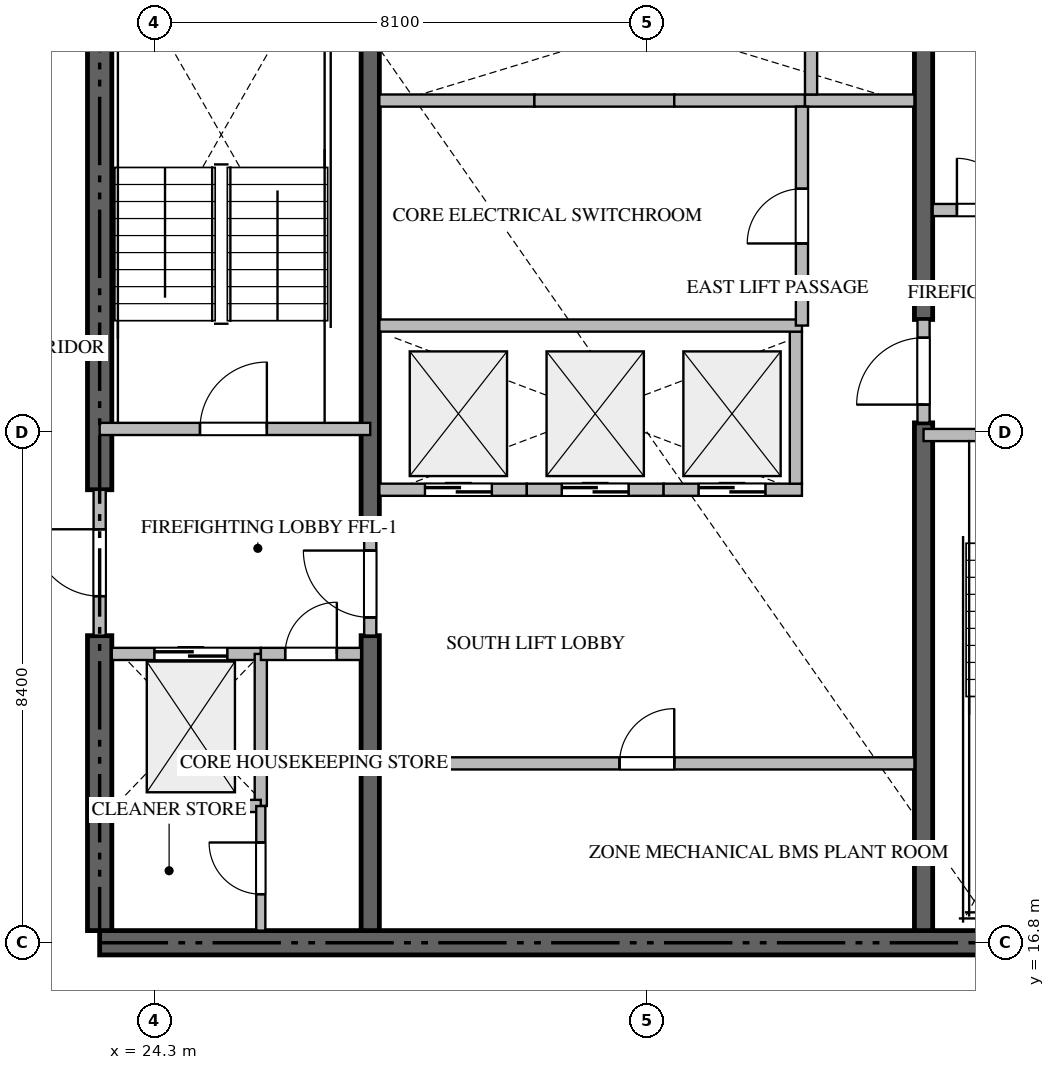
"""IFC4 building model, lengths in metres.
Left out: names, types, materials, properties, quantities, classifications, styles, units other than length and angle.
Written with IfcOpenShell. Run it as: python <this file> out.ifc"""

import sys

from ifc_helpers import new_model, si_unit, direction, frame, frame_2d, origin, place, context, subcontext, project, spatial, rectangle, extrude, source, transform, mapped, element, fill, save


model = new_model("IFC4")
c1 = context("Model", 3, precision=1e-05, world=origin(), true_north=direction((0.0, 1.0)))
c2 = subcontext(c1, "Body", "Model", "MODEL_VIEW")
j1 = project(units=[si_unit("LENGTHUNIT", "METRE"), si_unit("PLANEANGLEUNIT", "RADIAN")], contexts=[c1])
p1 = place(None, origin())
s1 = spatial("IfcSite", under=j1, at=p1, CompositionType="ELEMENT")
p2 = place(p1, origin())
s2 = spatial("IfcBuilding", under=s1, at=p2, CompositionType="ELEMENT")
p3 = place(p2, frame((0.0, 0.0, 146.4)))
s3 = spatial("IfcBuildingStorey", under=s2, at=p3, CompositionType="ELEMENT", Elevation=146.4)
p4 = place(p3, frame((23.4, 16.8, -0.26), z_axis=(0.0, 0.0, 1.0), x_axis=(1.0, 0.0, 0.0)))
e1 = element("IfcWall", 1, at=p4, inside=s3, PredefinedType="SHEAR", context=c2, shape_type="SweptSolid", body=[
    extrude(rectangle(XDim=18.0, YDim=0.4, at=frame_2d((9.0, 0.0))), origin(), (0.0, 0.0, 1.0), 3.748),
])
p5 = place(p3, frame((23.4, 17.0, -0.26), z_axis=(0.0, 0.0, 1.0), x_axis=(0.0, 1.0, 0.0)))
e2 = element("IfcWall", 2, at=p5, inside=s3, PredefinedType="SHEAR", context=c2, shape_type="SweptSolid", body=[
    extrude(rectangle(XDim=4.85, YDim=0.4, at=frame_2d((2.425, 0.0))), origin(), (0.0, 0.0, 1.0), 3.748),
])
p6 = place(p3, frame((23.4, 24.25, -0.26), z_axis=(0.0, 0.0, 1.0), x_axis=(0.0, 1.0, 0.0)))
e3 = element("IfcWall", 3, at=p6, inside=s3, PredefinedType="SHEAR", context=c2, shape_type="SweptSolid", body=[
    extrude(rectangle(XDim=9.15, YDim=0.4, at=frame_2d((4.575, 0.0))), origin(), (0.0, 0.0, 1.0), 3.748),
])
p7 = place(p3, frame((27.85, 17.0, -0.26), z_axis=(0.0, 0.0, 1.0), x_axis=(0.0, 1.0, 0.0)))
e4 = element("IfcWall", 4, at=p7, inside=s3, PredefinedType="SHEAR", context=c2, shape_type="SweptSolid", body=[
    extrude(rectangle(XDim=4.85, YDim=0.3, at=frame_2d((2.425, 0.0))), origin(), (0.0, 0.0, 1.0), 3.748),
])
p8 = place(p3, frame((27.85, 23.55, -0.26), z_axis=(0.0, 0.0, 1.0), x_axis=(0.0, 1.0, 0.0)))
e5 = element("IfcWall", 5, at=p8, inside=s3, PredefinedType="SHEAR", context=c2, shape_type="SweptSolid", body=[
    extrude(rectangle(XDim=9.85, YDim=0.3, at=frame_2d((4.925, 0.0))), origin(), (0.0, 0.0, 1.0), 3.748),
])
p9 = place(p3, frame((36.95, 17.0, -0.26), z_axis=(0.0, 0.0, 1.0), x_axis=(0.0, 1.0, 0.0)))
e6 = element("IfcWall", 6, at=p9, inside=s3, PredefinedType="SHEAR", context=c2, shape_type="SweptSolid", body=[
    extrude(rectangle(XDim=8.35, YDim=0.3, at=frame_2d((4.175, 0.0))), origin(), (0.0, 0.0, 1.0), 3.748),
])
p10 = place(p3, frame((36.95, 27.05, -0.26), z_axis=(0.0, 0.0, 1.0), x_axis=(0.0, 1.0, 0.0)))
e7 = element("IfcWall", 7, at=p10, inside=s3, PredefinedType="SHEAR", context=c2, shape_type="SweptSolid", body=[
    extrude(rectangle(XDim=6.35, YDim=0.3, at=frame_2d((3.175, 0.0))), origin(), (0.0, 0.0, 1.0), 3.748),
])
p11 = place(p3, frame((23.4, 25.25, 0.0), z_axis=(0.0, 0.0, 1.0), x_axis=(1.0, 0.0, 0.0)))
e8 = element("IfcWall", 8, at=p11, inside=s3, PredefinedType="STANDARD", context=c2, shape_type="SweptSolid", body=[
    extrude(rectangle(XDim=4.45, YDim=0.2, at=frame_2d((2.225, 0.0))), origin(), (0.0, 0.0, 1.0), 3.49),
])
p12 = place(p11, frame((1.65, 0.0, 0.0)))
e9 = element("IfcOpeningElement", 9, at=p12, cuts=e8, PredefinedType="OPENING", context=c2, shape_type="SweptSolid", body=[
    extrude(rectangle(XDim=1.1, YDim=2.15, at=frame_2d((0.55, 1.075))), frame((0.0, 0.11, 0.0), z_axis=(0.0, -1.0, 0.0), x_axis=(1.0, 0.0, 0.0)), (0.0, 0.0, 1.0), 0.22),
])
p13 = place(p3, frame((36.95, 25.15, 0.0), z_axis=(0.0, 0.0, 1.0), x_axis=(1.0, 0.0, 0.0)))
e10 = element("IfcWall", 10, at=p13, inside=s3, PredefinedType="STANDARD", context=c2, shape_type="SweptSolid", body=[
    extrude(rectangle(XDim=4.45, YDim=0.2, at=frame_2d((2.225, 0.0))), origin(), (0.0, 0.0, 1.0), 3.49),
])
p14 = place(p13, frame((1.65, 0.0, 0.0)))
e11 = element("IfcOpeningElement", 11, at=p14, cuts=e10, PredefinedType="OPENING", context=c2, shape_type="SweptSolid", body=[
    extrude(rectangle(XDim=1.1, YDim=2.15, at=frame_2d((0.55, 1.075))), frame((0.0, 0.11, 0.0), z_axis=(0.0, -1.0, 0.0), x_axis=(1.0, 0.0, 0.0)), (0.0, 0.0, 1.0), 0.22),
])
p15 = place(p3, frame((23.6, 21.55, 0.0), z_axis=(0.0, 0.0, 1.0), x_axis=(1.0, 0.0, 0.0)))
e12 = element("IfcWall", 12, at=p15, inside=s3, PredefinedType="STANDARD", context=c2, shape_type="SweptSolid", body=[
    extrude(rectangle(XDim=2.45, YDim=0.2, at=frame_2d((1.225, 0.0))), origin(), (0.0, 0.0, 1.0), 3.49),
])
p16 = place(p15, frame((0.7, 0.0, 0.0)))
e13 = element("IfcOpeningElement", 13, at=p16, cuts=e12, PredefinedType="OPENING", context=c2, shape_type="SweptSolid", body=[
    extrude(rectangle(XDim=1.2, YDim=2.2, at=frame_2d((0.6, 1.1))), frame((0.0, 0.11, 0.0), z_axis=(0.0, -1.0, 0.0), x_axis=(1.0, 0.0, 0.0)), (0.0, 0.0, 1.0), 0.22),
])
p17 = place(p3, frame((28.0, 24.25, 0.0), z_axis=(0.0, 0.0, 1.0), x_axis=(1.0, 0.0, 0.0)))
e14 = element("IfcWall", 14, at=p17, inside=s3, PredefinedType="STANDARD", context=c2, shape_type="SweptSolid", body=[
    extrude(rectangle(XDim=2.425, YDim=0.2, at=frame_2d((1.212, 0.0))), origin(), (0.0, 0.0, 1.0), 3.49),
])
p18 = place(p17, frame((0.75, 0.0, 0.0)))
e15 = element("IfcOpeningElement", 15, at=p18, cuts=e14, PredefinedType="OPENING", context=c2, shape_type="SweptSolid", body=[
    extrude(rectangle(XDim=1.1, YDim=2.2, at=frame_2d((0.55, 1.1))), frame((0.0, 0.11, 0.0), z_axis=(0.0, -1.0, 0.0), x_axis=(1.0, 0.0, 0.0)), (0.0, 0.0, 1.0), 0.22),
])
p19 = place(p3, frame((30.425, 24.25, 0.0), z_axis=(0.0, 0.0, 1.0), x_axis=(1.0, 0.0, 0.0)))
e16 = element("IfcWall", 16, at=p19, inside=s3, PredefinedType="STANDARD", context=c2, shape_type="SweptSolid", body=[
    extrude(rectangle(XDim=2.25, YDim=0.2, at=frame_2d((1.125, 0.0))), origin(), (0.0, 0.0, 1.0), 3.49),
])
p20 = place(p19, frame((0.575, 0.0, 0.0)))
e17 = element("IfcOpeningElement", 17, at=p20, cuts=e16, PredefinedType="OPENING", context=c2, shape_type="SweptSolid", body=[
    extrude(rectangle(XDim=1.1, YDim=2.2, at=frame_2d((0.55, 1.1))), frame((0.0, 0.11, 0.0), z_axis=(0.0, -1.0, 0.0), x_axis=(1.0, 0.0, 0.0)), (0.0, 0.0, 1.0), 0.22),
])
p21 = place(p3, frame((32.675, 24.25, 0.0), z_axis=(0.0, 0.0, 1.0), x_axis=(1.0, 0.0, 0.0)))
e18 = element("IfcWall", 18, at=p21, inside=s3, PredefinedType="STANDARD", context=c2, shape_type="SweptSolid", body=[
    extrude(rectangle(XDim=2.275, YDim=0.2, at=frame_2d((1.137, 0.0))), origin(), (0.0, 0.0, 1.0), 3.49),
])
p22 = place(p21, frame((0.575, 0.0, 0.0)))
e19 = element("IfcOpeningElement", 19, at=p22, cuts=e18, PredefinedType="OPENING", context=c2, shape_type="SweptSolid", body=[
    extrude(rectangle(XDim=1.1, YDim=2.2, at=frame_2d((0.55, 1.1))), frame((0.0, 0.11, 0.0), z_axis=(0.0, -1.0, 0.0), x_axis=(1.0, 0.0, 0.0)), (0.0, 0.0, 1.0), 0.22),
])
p23 = place(p3, frame((34.85, 24.35, 0.0), z_axis=(0.0, 0.0, 1.0), x_axis=(0.0, 1.0, 0.0)))
e20 = element("IfcWall", 20, at=p23, inside=s3, PredefinedType="STANDARD", context=c2, shape_type="SweptSolid", body=[
    extrude(rectangle(XDim=2.5, YDim=0.2, at=frame_2d((1.25, 0.0))), origin(), (0.0, 0.0, 1.0), 3.49),
])
p24 = place(p3, frame((28.0, 30.65, 0.0), z_axis=(0.0, 0.0, 1.0), x_axis=(1.0, 0.0, 0.0)))
e21 = element("IfcWall", 21, at=p24, inside=s3, PredefinedType="STANDARD", context=c2, shape_type="SweptSolid", body=[
    extrude(rectangle(XDim=2.55, YDim=0.2, at=frame_2d((1.275, 0.0))), origin(), (0.0, 0.0, 1.0), 3.49),
])
p25 = place(p3, frame((30.55, 30.65, 0.0), z_axis=(0.0, 0.0, 1.0), x_axis=(1.0, 0.0, 0.0)))
e22 = element("IfcWall", 22, at=p25, inside=s3, PredefinedType="STANDARD", context=c2, shape_type="SweptSolid", body=[
    extrude(rectangle(XDim=2.3, YDim=0.2, at=frame_2d((1.15, 0.0))), origin(), (0.0, 0.0, 1.0), 3.49),
])
p26 = place(p3, frame((32.85, 30.65, 0.0), z_axis=(0.0, 0.0, 1.0), x_axis=(1.0, 0.0, 0.0)))
e23 = element("IfcWall", 23, at=p26, inside=s3, PredefinedType="STANDARD", context=c2, shape_type="SweptSolid", body=[
    extrude(rectangle(XDim=2.15, YDim=0.2, at=frame_2d((1.075, 0.0))), origin(), (0.0, 0.0, 1.0), 3.49),
])
p27 = place(p3, frame((35.0, 30.65, 0.0), z_axis=(0.0, 0.0, 1.0), x_axis=(1.0, 0.0, 0.0)))
e24 = element("IfcWall", 24, at=p27, inside=s3, PredefinedType="STANDARD", context=c2, shape_type="SweptSolid", body=[
    extrude(rectangle(XDim=1.8, YDim=0.2, at=frame_2d((0.9, 0.0))), origin(), (0.0, 0.0, 1.0), 3.49),
])
p28 = place(p3, frame((35.1, 30.75, 0.0), z_axis=(0.0, 0.0, 1.0), x_axis=(0.0, 1.0, 0.0)))
e25 = element("IfcWall", 25, at=p28, inside=s3, PredefinedType="STANDARD", context=c2, shape_type="SweptSolid", body=[
    extrude(rectangle(XDim=2.65, YDim=0.2, at=frame_2d((1.325, 0.0))), origin(), (0.0, 0.0, 1.0), 3.49),
])
p29 = place(p3, frame((26.05, 19.05, 0.0), z_axis=(0.0, 0.0, 1.0), x_axis=(0.0, 1.0, 0.0)))
e26 = element("IfcWall", 26, at=p29, inside=s3, PredefinedType="STANDARD", context=c2, shape_type="SweptSolid", body=[
    extrude(rectangle(XDim=2.5, YDim=0.2, at=frame_2d((1.25, 0.0))), origin(), (0.0, 0.0, 1.0), 3.49),
])
p30 = place(p3, frame((23.6, 19.05, 0.0), z_axis=(0.0, 0.0, 1.0), x_axis=(1.0, 0.0, 0.0)))
e27 = element("IfcWall", 27, at=p30, inside=s3, PredefinedType="STANDARD", context=c2, shape_type="SweptSolid", body=[
    extrude(rectangle(XDim=2.45, YDim=0.2, at=frame_2d((1.225, 0.0))), origin(), (0.0, 0.0, 1.0), 3.49),
])
p31 = place(p3, frame((26.052, 21.55, 0.0), z_axis=(0.0, 0.0, 1.0), x_axis=(1.0, 0.0, 0.0)))
e28 = element("IfcWall", 28, at=p31, inside=s3, PredefinedType="STANDARD", context=c2, shape_type="SweptSolid", body=[
    extrude(rectangle(XDim=1.648, YDim=0.2, at=frame_2d((0.824, 0.0))), origin(), (0.0, 0.0, 1.0), 3.49),
])
p32 = place(p31, frame((0.399, 0.0, 0.0)))
e29 = element("IfcOpeningElement", 29, at=p32, cuts=e28, PredefinedType="OPENING", context=c2, shape_type="SweptSolid", body=[
    extrude(rectangle(XDim=0.85, YDim=2.1, at=frame_2d((0.425, 1.05))), frame((0.0, 0.11, 0.0), z_axis=(0.0, -1.0, 0.0), x_axis=(1.0, 0.0, 0.0)), (0.0, 0.0, 1.0), 0.22),
])
p33 = place(p3, frame((37.1, 28.85, 0.0), z_axis=(0.0, 0.0, 1.0), x_axis=(1.0, 0.0, 0.0)))
e30 = element("IfcWall", 30, at=p33, inside=s3, PredefinedType="STANDARD", context=c2, shape_type="SweptSolid", body=[
    extrude(rectangle(XDim=1.648, YDim=0.2, at=frame_2d((0.824, 0.0))), origin(), (0.0, 0.0, 1.0), 3.49),
])
p34 = place(p33, frame((0.399, 0.0, 0.0)))
e31 = element("IfcOpeningElement", 31, at=p34, cuts=e30, PredefinedType="OPENING", context=c2, shape_type="SweptSolid", body=[
    extrude(rectangle(XDim=0.85, YDim=2.1, at=frame_2d((0.425, 1.05))), frame((0.0, 0.11, 0.0), z_axis=(0.0, -1.0, 0.0), x_axis=(1.0, 0.0, 0.0)), (0.0, 0.0, 1.0), 0.22),
])
p35 = place(p3, frame((23.4, 21.852, 0.0), z_axis=(0.0, 0.0, 1.0), x_axis=(0.0, 1.0, 0.0)))
e32 = element("IfcWall", 32, at=p35, inside=s3, PredefinedType="STANDARD", context=c2, shape_type="SweptSolid", body=[
    extrude(rectangle(XDim=2.396, YDim=0.2, at=frame_2d((1.198, 0.0))), origin(), (0.0, 0.0, 1.0), 3.49),
])
p36 = place(p35, frame((0.648, 0.0, 0.0)))
e33 = element("IfcOpeningElement", 33, at=p36, cuts=e32, PredefinedType="OPENING", context=c2, shape_type="SweptSolid", body=[
    extrude(rectangle(XDim=1.1, YDim=2.15, at=frame_2d((0.55, 1.075))), frame((0.0, 0.11, 0.0), z_axis=(0.0, -1.0, 0.0), x_axis=(1.0, 0.0, 0.0)), (0.0, 0.0, 1.0), 0.22),
])
p37 = place(p3, frame((27.85, 21.852, 0.0), z_axis=(0.0, 0.0, 1.0), x_axis=(0.0, 1.0, 0.0)))
e34 = element("IfcWall", 34, at=p37, inside=s3, PredefinedType="STANDARD", context=c2, shape_type="SweptSolid", body=[
    extrude(rectangle(XDim=1.696, YDim=0.2, at=frame_2d((0.848, 0.0))), origin(), (0.0, 0.0, 1.0), 3.49),
])
p38 = place(p37, frame((0.298, 0.0, 0.0)))
e35 = element("IfcOpeningElement", 35, at=p38, cuts=e34, PredefinedType="OPENING", context=c2, shape_type="SweptSolid", body=[
    extrude(rectangle(XDim=1.1, YDim=2.15, at=frame_2d((0.55, 1.075))), frame((0.0, 0.11, 0.0), z_axis=(0.0, -1.0, 0.0), x_axis=(1.0, 0.0, 0.0)), (0.0, 0.0, 1.0), 0.22),
])
p39 = place(p3, frame((36.95, 25.352, 0.0), z_axis=(0.0, 0.0, 1.0), x_axis=(0.0, 1.0, 0.0)))
e36 = element("IfcWall", 36, at=p39, inside=s3, PredefinedType="STANDARD", context=c2, shape_type="SweptSolid", body=[
    extrude(rectangle(XDim=1.696, YDim=0.2, at=frame_2d((0.848, 0.0))), origin(), (0.0, 0.0, 1.0), 3.49),
])
p40 = place(p39, frame((0.298, 0.0, 0.0)))
e37 = element("IfcOpeningElement", 37, at=p40, cuts=e36, PredefinedType="OPENING", context=c2, shape_type="SweptSolid", body=[
    extrude(rectangle(XDim=1.1, YDim=2.15, at=frame_2d((0.55, 1.075))), frame((0.0, 0.11, 0.0), z_axis=(0.0, -1.0, 0.0), x_axis=(1.0, 0.0, 0.0)), (0.0, 0.0, 1.0), 0.22),
])
p41 = place(p3, frame((28.0, 26.95, 0.0), z_axis=(0.0, 0.0, 1.0), x_axis=(1.0, 0.0, 0.0)))
e38 = element("IfcWall", 38, at=p41, inside=s3, PredefinedType="STANDARD", context=c2, shape_type="SweptSolid", body=[
    extrude(rectangle(XDim=6.95, YDim=0.2, at=frame_2d((3.475, 0.0))), origin(), (0.0, 0.0, 1.0), 3.49),
])
p42 = place(p3, frame((26.05, 17.0, 0.0), z_axis=(0.0, 0.0, 1.0), x_axis=(0.0, 1.0, 0.0)))
e39 = element("IfcWall", 39, at=p42, inside=s3, PredefinedType="PARTITIONING", context=c2, shape_type="SweptSolid", body=[
    extrude(rectangle(XDim=2.048, YDim=0.15, at=frame_2d((1.024, 0.0))), origin(), (0.0, 0.0, 1.0), 3.49),
])
p43 = place(p42, frame((0.599, 0.0, 0.0)))
e40 = element("IfcOpeningElement", 40, at=p43, cuts=e39, PredefinedType="OPENING", context=c2, shape_type="SweptSolid", body=[
    extrude(rectangle(XDim=0.85, YDim=2.1, at=frame_2d((0.425, 1.05))), frame((0.0, 0.085, 0.0), z_axis=(0.0, -1.0, 0.0), x_axis=(1.0, 0.0, 0.0)), (0.0, 0.0, 1.0), 0.17),
])
p44 = place(p3, frame((34.95, 26.95, 0.0), z_axis=(0.0, 0.0, 1.0), x_axis=(0.0, 1.0, 0.0)))
e41 = element("IfcWall", 41, at=p44, inside=s3, PredefinedType="STANDARD", context=c2, shape_type="SweptSolid", body=[
    extrude(rectangle(XDim=3.6, YDim=0.2, at=frame_2d((1.8, 0.0))), origin(), (0.0, 0.0, 1.0), 3.49),
])
p45 = place(p44, frame((1.35, 0.0, 0.0)))
e42 = element("IfcOpeningElement", 42, at=p45, cuts=e41, PredefinedType="OPENING", context=c2, shape_type="SweptSolid", body=[
    extrude(rectangle(XDim=0.9, YDim=2.1, at=frame_2d((0.45, 1.05))), frame((0.0, 0.11, 0.0), z_axis=(0.0, -1.0, 0.0), x_axis=(1.0, 0.0, 0.0)), (0.0, 0.0, 1.0), 0.22),
])
p46 = place(p3, frame((28.0, 19.75, 0.0), z_axis=(0.0, 0.0, 1.0), x_axis=(1.0, 0.0, 0.0)))
e43 = element("IfcWall", 43, at=p46, inside=s3, PredefinedType="STANDARD", context=c2, shape_type="SweptSolid", body=[
    extrude(rectangle(XDim=8.8, YDim=0.2, at=frame_2d((4.4, 0.0))), origin(), (0.0, 0.0, 1.0), 3.49),
])
p47 = place(p46, frame((3.95, 0.0, 0.0)))
e44 = element("IfcOpeningElement", 44, at=p47, cuts=e43, PredefinedType="OPENING", context=c2, shape_type="SweptSolid", body=[
    extrude(rectangle(XDim=0.9, YDim=2.1, at=frame_2d((0.45, 1.05))), frame((0.0, 0.11, 0.0), z_axis=(0.0, -1.0, 0.0), x_axis=(1.0, 0.0, 0.0)), (0.0, 0.0, 1.0), 0.22),
])
m1 = source(origin(), c2, "Body", "SweptSolid", [
    extrude(rectangle(XDim=1.1, YDim=2.15, at=frame_2d((0.55, 1.075))), frame((0.0, 0.025, 0.0), z_axis=(0.0, -1.0, 0.0), x_axis=(1.0, 0.0, 0.0)), (0.0, 0.0, 1.0), 0.05),
])
p48 = place(p12, origin())
e45 = element("IfcDoor", 45, at=p48, inside=s3, OperationType="SINGLE_SWING_RIGHT", PredefinedType="DOOR", context=c2, shape_type="MappedRepresentation", body=[
    mapped(m1, transform((0.0, 0.0, 0.0), scale=1.0)),
])
fill(e9, e45)
m2 = source(origin(), c2, "Body", "SweptSolid", [
    extrude(rectangle(XDim=1.2, YDim=2.2, at=frame_2d((0.6, 1.1))), frame((0.0, 0.025, 0.0), z_axis=(0.0, -1.0, 0.0), x_axis=(1.0, 0.0, 0.0)), (0.0, 0.0, 1.0), 0.05),
])
p49 = place(p16, origin())
e46 = element("IfcDoor", 46, at=p49, inside=s3, OperationType="DOUBLE_DOOR_SLIDING", PredefinedType="DOOR", context=c2, shape_type="MappedRepresentation", body=[
    mapped(m2, transform((0.0, 0.0, 0.0), scale=1.0)),
])
fill(e13, e46)
m3 = source(origin(), c2, "Body", "SweptSolid", [
    extrude(rectangle(XDim=1.1, YDim=2.2, at=frame_2d((0.55, 1.1))), frame((0.0, 0.025, 0.0), z_axis=(0.0, -1.0, 0.0), x_axis=(1.0, 0.0, 0.0)), (0.0, 0.0, 1.0), 0.05),
])
p50 = place(p18, origin())
e47 = element("IfcDoor", 47, at=p50, inside=s3, OperationType="DOUBLE_DOOR_SLIDING", PredefinedType="DOOR", context=c2, shape_type="MappedRepresentation", body=[
    mapped(m3, transform((0.0, 0.0, 0.0), scale=1.0)),
])
fill(e15, e47)
p51 = place(p20, origin())
e48 = element("IfcDoor", 48, at=p51, inside=s3, OperationType="DOUBLE_DOOR_SLIDING", PredefinedType="DOOR", context=c2, shape_type="MappedRepresentation", body=[
    mapped(m3, transform((0.0, 0.0, 0.0), scale=1.0)),
])
fill(e17, e48)
p52 = place(p22, origin())
e49 = element("IfcDoor", 49, at=p52, inside=s3, OperationType="DOUBLE_DOOR_SLIDING", PredefinedType="DOOR", context=c2, shape_type="MappedRepresentation", body=[
    mapped(m3, transform((0.0, 0.0, 0.0), scale=1.0)),
])
fill(e19, e49)
m4 = source(origin(), c2, "Body", "SweptSolid", [
    extrude(rectangle(XDim=0.85, YDim=2.1, at=frame_2d((0.425, 1.05))), frame((0.0, 0.025, 0.0), z_axis=(0.0, -1.0, 0.0), x_axis=(1.0, 0.0, 0.0)), (0.0, 0.0, 1.0), 0.05),
])
p53 = place(p32, origin())
e50 = element("IfcDoor", 50, at=p53, inside=s3, OperationType="SINGLE_SWING_RIGHT", PredefinedType="DOOR", context=c2, shape_type="MappedRepresentation", body=[
    mapped(m4, transform((0.0, 0.0, 0.0), scale=1.0)),
])
fill(e29, e50)
p54 = place(p34, origin())
e51 = element("IfcDoor", 51, at=p54, inside=s3, OperationType="SINGLE_SWING_LEFT", PredefinedType="DOOR", context=c2, shape_type="MappedRepresentation", body=[
    mapped(m4, transform((0.0, 0.0, 0.0), scale=1.0)),
])
fill(e31, e51)
p55 = place(p36, origin())
e52 = element("IfcDoor", 52, at=p55, inside=s3, OperationType="SINGLE_SWING_RIGHT", PredefinedType="DOOR", context=c2, shape_type="MappedRepresentation", body=[
    mapped(m1, transform((0.0, 0.0, 0.0), scale=1.0)),
])
fill(e33, e52)
p56 = place(p38, origin())
e53 = element("IfcDoor", 53, at=p56, inside=s3, OperationType="SINGLE_SWING_RIGHT", PredefinedType="DOOR", context=c2, shape_type="MappedRepresentation", body=[
    mapped(m1, transform((0.0, 0.0, 0.0), scale=1.0)),
])
fill(e35, e53)
p57 = place(p40, origin())
e54 = element("IfcDoor", 54, at=p57, inside=s3, OperationType="SINGLE_SWING_LEFT", PredefinedType="DOOR", context=c2, shape_type="MappedRepresentation", body=[
    mapped(m1, transform((0.0, 0.0, 0.0), scale=1.0)),
])
fill(e37, e54)
p58 = place(p43, origin())
e55 = element("IfcDoor", 55, at=p58, inside=s3, OperationType="SINGLE_SWING_RIGHT", PredefinedType="DOOR", context=c2, shape_type="MappedRepresentation", body=[
    mapped(m4, transform((0.0, 0.0, 0.0), scale=1.0)),
])
fill(e40, e55)
m5 = source(origin(), c2, "Body", "SweptSolid", [
    extrude(rectangle(XDim=0.9, YDim=2.1, at=frame_2d((0.45, 1.05))), frame((0.0, 0.025, 0.0), z_axis=(0.0, -1.0, 0.0), x_axis=(1.0, 0.0, 0.0)), (0.0, 0.0, 1.0), 0.05),
])
p59 = place(p45, origin())
e56 = element("IfcDoor", 56, at=p59, inside=s3, OperationType="SINGLE_SWING_LEFT", PredefinedType="DOOR", context=c2, shape_type="MappedRepresentation", body=[
    mapped(m5, transform((0.0, 0.0, 0.0), scale=1.0)),
])
fill(e42, e56)
p60 = place(p47, origin())
e57 = element("IfcDoor", 57, at=p60, inside=s3, OperationType="SINGLE_SWING_RIGHT", PredefinedType="DOOR", context=c2, shape_type="MappedRepresentation", body=[
    mapped(m5, transform((0.0, 0.0, 0.0), scale=1.0)),
])
fill(e44, e57)
save(model, sys.argv[1])
